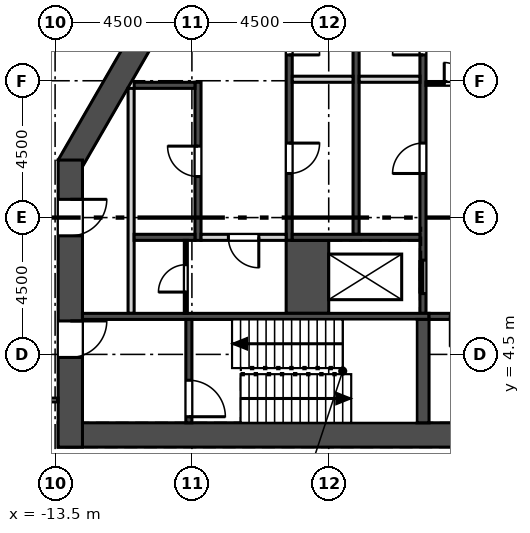
"""IFC4 building model, lengths in metres.
Left out: names, types, materials, properties, quantities, classifications, styles, units other than length and angle.
Written with IfcOpenShell. Run it as: python <this file> out.ifc"""

import sys

from ifc_helpers import new_model, si_unit, direction, frame, frame_2d, origin, place, context, subcontext, project, spatial, rectangle, extrude, element, fill, save


model = new_model("IFC4")
c1 = context("Model", 3, precision=1e-05, world=origin(), true_north=direction((0.0, 1.0)))
c2 = subcontext(c1, "Body", "Model", "MODEL_VIEW")
j1 = project(units=[si_unit("LENGTHUNIT", "METRE"), si_unit("PLANEANGLEUNIT", "RADIAN")], contexts=[c1])
p1 = place(None, origin())
s1 = spatial("IfcSite", under=j1, at=p1, CompositionType="ELEMENT")
p2 = place(p1, origin())
s2 = spatial("IfcBuilding", under=s1, at=p2, CompositionType="ELEMENT")
p3 = place(p2, frame((0.0, 0.0, 335.1)))
s3 = spatial("IfcBuildingStorey", under=s2, at=p3, CompositionType="ELEMENT", Elevation=335.1)
p4 = place(p3, frame((-13.4, 1.85, 0.0), z_axis=(0.0, 0.0, 1.0), x_axis=(1.0, 0.0, 0.0)))
e1 = element("IfcWall", 1, at=p4, inside=s3, PredefinedType="SHEAR", context=c2, shape_type="SweptSolid", body=[
    extrude(rectangle(XDim=26.8, YDim=0.8, at=frame_2d((13.4, 0.0))), origin(), (0.0, 0.0, 1.0), 4.2),
])
p5 = place(p3, frame((-8.719, 18.2, 0.0), z_axis=(0.0, 0.0, 1.0), x_axis=(-0.500015780397, -0.866016292776, 0.0)))
e2 = element("IfcWall", 2, at=p5, inside=s3, PredefinedType="SHEAR", context=c2, shape_type="SweptSolid", body=[
    extrude(rectangle(XDim=8.67, YDim=0.8, at=frame_2d((4.335, 0.0))), origin(), (0.0, 0.0, 1.0), 4.2),
])
p6 = place(p3, frame((-13.0, 10.892, 0.0), z_axis=(0.0, 0.0, 1.0), x_axis=(0.0, -1.0, 0.0)))
e3 = element("IfcWall", 3, at=p6, inside=s3, PredefinedType="SHEAR", context=c2, shape_type="SweptSolid", body=[
    extrude(rectangle(XDim=9.442, YDim=0.8, at=frame_2d((4.721, 0.0))), origin(), (0.0, 0.0, 1.0), 4.2),
])
p7 = place(p6, frame((5.292, 0.0, 0.0)))
e4 = element("IfcOpeningElement", 4, at=p7, cuts=e3, PredefinedType="OPENING", context=c2, shape_type="SweptSolid", body=[
    extrude(rectangle(XDim=1.2, YDim=2.1, at=frame_2d((0.6, 1.05))), frame((0.0, 0.41, 0.0), z_axis=(0.0, -1.0, 0.0), x_axis=(1.0, 0.0, 0.0)), (0.0, 0.0, 1.0), 0.82),
])
p8 = place(p6, frame((1.292, 0.0, 0.0)))
e5 = element("IfcOpeningElement", 5, at=p8, cuts=e3, PredefinedType="OPENING", context=c2, shape_type="SweptSolid", body=[
    extrude(rectangle(XDim=1.2, YDim=2.1, at=frame_2d((0.6, 1.05))), frame((0.0, 0.41, 0.0), z_axis=(0.0, -1.0, 0.0), x_axis=(1.0, 0.0, 0.0)), (0.0, 0.0, 1.0), 0.82),
])
p9 = place(p3, frame((-4.353, 41.372, 0.0), z_axis=(0.0, 0.0, 1.0), x_axis=(-0.500001731347, -0.866024404189, 0.0)))
e6 = element("IfcWall", 6, at=p9, inside=s3, PredefinedType="SOLIDWALL", context=c2, shape_type="SweptSolid", body=[
    extrude(rectangle(XDim=38.87, YDim=0.34, at=frame_2d((19.435, 0.0))), origin(), (0.0, 0.0, 1.0), 3.8),
])
p10 = place(p9, frame((3.653, 0.0, 0.9)))
e7 = element("IfcOpeningElement", 7, at=p10, cuts=e6, PredefinedType="OPENING", context=c2, shape_type="SweptSolid", body=[
    extrude(rectangle(XDim=1.885, YDim=2.6, at=frame_2d((0.942, 1.3))), frame((0.0, 0.18, 0.0), z_axis=(0.0, -1.0, 0.0), x_axis=(1.0, 0.0, 0.0)), (0.0, 0.0, 1.0), 0.36),
])
p11 = place(p9, frame((6.653, 0.0, 0.9)))
e8 = element("IfcOpeningElement", 8, at=p11, cuts=e6, PredefinedType="OPENING", context=c2, shape_type="SweptSolid", body=[
    extrude(rectangle(XDim=1.885, YDim=2.6, at=frame_2d((0.942, 1.3))), frame((0.0, 0.18, 0.0), z_axis=(0.0, -1.0, 0.0), x_axis=(1.0, 0.0, 0.0)), (0.0, 0.0, 1.0), 0.36),
])
p12 = place(p9, frame((9.653, 0.0, 0.9)))
e9 = element("IfcOpeningElement", 9, at=p12, cuts=e6, PredefinedType="OPENING", context=c2, shape_type="SweptSolid", body=[
    extrude(rectangle(XDim=1.885, YDim=2.6, at=frame_2d((0.942, 1.3))), frame((0.0, 0.18, 0.0), z_axis=(0.0, -1.0, 0.0), x_axis=(1.0, 0.0, 0.0)), (0.0, 0.0, 1.0), 0.36),
])
p13 = place(p9, frame((12.653, 0.0, 0.9)))
e10 = element("IfcOpeningElement", 10, at=p13, cuts=e6, PredefinedType="OPENING", context=c2, shape_type="SweptSolid", body=[
    extrude(rectangle(XDim=1.885, YDim=2.6, at=frame_2d((0.942, 1.3))), frame((0.0, 0.18, 0.0), z_axis=(0.0, -1.0, 0.0), x_axis=(1.0, 0.0, 0.0)), (0.0, 0.0, 1.0), 0.36),
])
p14 = place(p9, frame((15.653, 0.0, 0.9)))
e11 = element("IfcOpeningElement", 11, at=p14, cuts=e6, PredefinedType="OPENING", context=c2, shape_type="SweptSolid", body=[
    extrude(rectangle(XDim=1.885, YDim=2.6, at=frame_2d((0.942, 1.3))), frame((0.0, 0.18, 0.0), z_axis=(0.0, -1.0, 0.0), x_axis=(1.0, 0.0, 0.0)), (0.0, 0.0, 1.0), 0.36),
])
p15 = place(p9, frame((18.653, 0.0, 0.9)))
e12 = element("IfcOpeningElement", 12, at=p15, cuts=e6, PredefinedType="OPENING", context=c2, shape_type="SweptSolid", body=[
    extrude(rectangle(XDim=1.885, YDim=2.6, at=frame_2d((0.942, 1.3))), frame((0.0, 0.18, 0.0), z_axis=(0.0, -1.0, 0.0), x_axis=(1.0, 0.0, 0.0)), (0.0, 0.0, 1.0), 0.36),
])
p16 = place(p9, frame((21.653, 0.0, 0.9)))
e13 = element("IfcOpeningElement", 13, at=p16, cuts=e6, PredefinedType="OPENING", context=c2, shape_type="SweptSolid", body=[
    extrude(rectangle(XDim=1.885, YDim=2.6, at=frame_2d((0.942, 1.3))), frame((0.0, 0.18, 0.0), z_axis=(0.0, -1.0, 0.0), x_axis=(1.0, 0.0, 0.0)), (0.0, 0.0, 1.0), 0.36),
])
p17 = place(p9, frame((24.653, 0.0, 0.9)))
e14 = element("IfcOpeningElement", 14, at=p17, cuts=e6, PredefinedType="OPENING", context=c2, shape_type="SweptSolid", body=[
    extrude(rectangle(XDim=1.885, YDim=2.6, at=frame_2d((0.942, 1.3))), frame((0.0, 0.18, 0.0), z_axis=(0.0, -1.0, 0.0), x_axis=(1.0, 0.0, 0.0)), (0.0, 0.0, 1.0), 0.36),
])
p18 = place(p9, frame((27.653, 0.0, 0.9)))
e15 = element("IfcOpeningElement", 15, at=p18, cuts=e6, PredefinedType="OPENING", context=c2, shape_type="SweptSolid", body=[
    extrude(rectangle(XDim=1.885, YDim=2.6, at=frame_2d((0.942, 1.3))), frame((0.0, 0.18, 0.0), z_axis=(0.0, -1.0, 0.0), x_axis=(1.0, 0.0, 0.0)), (0.0, 0.0, 1.0), 0.36),
])
p19 = place(p9, frame((30.653, 0.0, 0.9)))
e16 = element("IfcOpeningElement", 16, at=p19, cuts=e6, PredefinedType="OPENING", context=c2, shape_type="SweptSolid", body=[
    extrude(rectangle(XDim=1.885, YDim=2.6, at=frame_2d((0.942, 1.3))), frame((0.0, 0.18, 0.0), z_axis=(0.0, -1.0, 0.0), x_axis=(1.0, 0.0, 0.0)), (0.0, 0.0, 1.0), 0.36),
])
p20 = place(p9, frame((33.653, 0.0, 0.9)))
e17 = element("IfcOpeningElement", 17, at=p20, cuts=e6, PredefinedType="OPENING", context=c2, shape_type="SweptSolid", body=[
    extrude(rectangle(XDim=1.885, YDim=2.6, at=frame_2d((0.942, 1.3))), frame((0.0, 0.18, 0.0), z_axis=(0.0, -1.0, 0.0), x_axis=(1.0, 0.0, 0.0)), (0.0, 0.0, 1.0), 0.36),
])
p21 = place(p9, frame((1.269, 0.0, 0.9)))
e18 = element("IfcOpeningElement", 18, at=p21, cuts=e6, PredefinedType="OPENING", context=c2, shape_type="SweptSolid", body=[
    extrude(rectangle(XDim=1.115, YDim=2.4, at=frame_2d((0.558, 1.2))), frame((0.0, 0.18, 0.0), z_axis=(0.0, -1.0, 0.0), x_axis=(1.0, 0.0, 0.0)), (0.0, 0.0, 1.0), 0.36),
])
p22 = place(p9, frame((36.646, 0.0, 0.9)))
e19 = element("IfcOpeningElement", 19, at=p22, cuts=e6, PredefinedType="OPENING", context=c2, shape_type="SweptSolid", body=[
    extrude(rectangle(XDim=1.115, YDim=2.4, at=frame_2d((0.558, 1.2))), frame((0.0, 0.18, 0.0), z_axis=(0.0, -1.0, 0.0), x_axis=(1.0, 0.0, 0.0)), (0.0, 0.0, 1.0), 0.36),
])
p23 = place(p3, frame((-11.0, 5.85, 0.0), z_axis=(0.0, 0.0, 1.0), x_axis=(0.0, 1.0, 0.0)))
e20 = element("IfcWall", 20, at=p23, inside=s3, PredefinedType="SOLIDWALL", context=c2, shape_type="SweptSolid", body=[
    extrude(rectangle(XDim=7.4, YDim=0.2, at=frame_2d((3.7, 0.0))), origin(), (0.0, 0.0, 1.0), 3.8),
])
p24 = place(p3, frame((-8.8, 8.25, -0.4), z_axis=(0.0, 0.0, 1.0), x_axis=(0.0, 1.0, 0.0)))
e21 = element("IfcWall", 21, at=p24, inside=s3, PredefinedType="SOLIDWALL", context=c2, shape_type="SweptSolid", body=[
    extrude(rectangle(XDim=5.2, YDim=0.2, at=frame_2d((2.6, 0.0))), origin(), (0.0, 0.0, 1.0), 4.2),
])
p25 = place(p24, frame((2.1, 0.0, 0.4)))
e22 = element("IfcOpeningElement", 22, at=p25, cuts=e21, PredefinedType="OPENING", context=c2, shape_type="SweptSolid", body=[
    extrude(rectangle(XDim=1.0, YDim=2.1, at=frame_2d((0.5, 1.05))), frame((0.0, 0.11, 0.0), z_axis=(0.0, -1.0, 0.0), x_axis=(1.0, 0.0, 0.0)), (0.0, 0.0, 1.0), 0.22),
])
p26 = place(p3, frame((-5.8, 8.25, -0.4), z_axis=(0.0, 0.0, 1.0), x_axis=(0.0, 1.0, 0.0)))
e23 = element("IfcWall", 23, at=p26, inside=s3, PredefinedType="SOLIDWALL", context=c2, shape_type="SweptSolid", body=[
    extrude(rectangle(XDim=8.0, YDim=0.2, at=frame_2d((4.0, 0.0))), origin(), (0.0, 0.0, 1.0), 4.2),
])
p27 = place(p26, frame((2.2, 0.0, 0.4)))
e24 = element("IfcOpeningElement", 24, at=p27, cuts=e23, PredefinedType="OPENING", context=c2, shape_type="SweptSolid", body=[
    extrude(rectangle(XDim=1.0, YDim=2.1, at=frame_2d((0.5, 1.05))), frame((0.0, 0.11, 0.0), z_axis=(0.0, -1.0, 0.0), x_axis=(1.0, 0.0, 0.0)), (0.0, 0.0, 1.0), 0.22),
])
p28 = place(p26, frame((6.1, 0.0, 0.4)))
e25 = element("IfcOpeningElement", 25, at=p28, cuts=e23, PredefinedType="OPENING", context=c2, shape_type="SweptSolid", body=[
    extrude(rectangle(XDim=1.0, YDim=2.1, at=frame_2d((0.5, 1.05))), frame((0.0, 0.11, 0.0), z_axis=(0.0, -1.0, 0.0), x_axis=(1.0, 0.0, 0.0)), (0.0, 0.0, 1.0), 0.22),
])
p29 = place(p3, frame((-3.6, 8.45, -0.4), z_axis=(0.0, 0.0, 1.0), x_axis=(0.0, 1.0, 0.0)))
e26 = element("IfcWall", 26, at=p29, inside=s3, PredefinedType="SOLIDWALL", context=c2, shape_type="SweptSolid", body=[
    extrude(rectangle(XDim=7.8, YDim=0.2, at=frame_2d((3.9, 0.0))), origin(), (0.0, 0.0, 1.0), 4.2),
])
p30 = place(p3, frame((-1.4, 5.85, -0.4), z_axis=(0.0, 0.0, 1.0), x_axis=(0.0, 1.0, 0.0)))
e27 = element("IfcWall", 27, at=p30, inside=s3, PredefinedType="SOLIDWALL", context=c2, shape_type="SweptSolid", body=[
    extrude(rectangle(XDim=11.75, YDim=0.2, at=frame_2d((5.875, 0.0))), origin(), (0.0, 0.0, 1.0), 4.2),
])
p31 = place(p30, frame((0.65, 0.0, 0.4)))
e28 = element("IfcOpeningElement", 28, at=p31, cuts=e27, PredefinedType="OPENING", context=c2, shape_type="SweptSolid", body=[
    extrude(rectangle(XDim=1.1, YDim=2.1, at=frame_2d((0.55, 1.05))), frame((0.0, 0.11, 0.0), z_axis=(0.0, -1.0, 0.0), x_axis=(1.0, 0.0, 0.0)), (0.0, 0.0, 1.0), 0.22),
])
p32 = place(p30, frame((4.6, 0.0, 0.4)))
e29 = element("IfcOpeningElement", 29, at=p32, cuts=e27, PredefinedType="OPENING", context=c2, shape_type="SweptSolid", body=[
    extrude(rectangle(XDim=1.0, YDim=2.1, at=frame_2d((0.5, 1.05))), frame((0.0, 0.11, 0.0), z_axis=(0.0, -1.0, 0.0), x_axis=(1.0, 0.0, 0.0)), (0.0, 0.0, 1.0), 0.22),
])
p33 = place(p30, frame((8.5, 0.0, 0.4)))
e30 = element("IfcOpeningElement", 30, at=p33, cuts=e27, PredefinedType="OPENING", context=c2, shape_type="SweptSolid", body=[
    extrude(rectangle(XDim=1.0, YDim=2.1, at=frame_2d((0.5, 1.05))), frame((0.0, 0.11, 0.0), z_axis=(0.0, -1.0, 0.0), x_axis=(1.0, 0.0, 0.0)), (0.0, 0.0, 1.0), 0.22),
])
p34 = place(p3, frame((-5.2, 5.85, -0.4), z_axis=(0.0, 0.0, 1.0), x_axis=(0.0, 1.0, 0.0)))
e31 = element("IfcWall", 31, at=p34, inside=s3, PredefinedType="SOLIDWALL", context=c2, shape_type="SweptSolid", body=[
    extrude(rectangle(XDim=2.4, YDim=1.4, at=frame_2d((1.2, 0.0))), origin(), (0.0, 0.0, 1.0), 4.2),
])
p35 = place(p3, frame((-10.9, 8.35, -0.4), z_axis=(0.0, 0.0, 1.0), x_axis=(1.0, 0.0, 0.0)))
e32 = element("IfcWall", 32, at=p35, inside=s3, PredefinedType="SOLIDWALL", context=c2, shape_type="SweptSolid", body=[
    extrude(rectangle(XDim=2.0, YDim=0.2, at=frame_2d((1.0, 0.0))), origin(), (0.0, 0.0, 1.0), 4.2),
])
p36 = place(p3, frame((-5.7, 8.35, -0.4), z_axis=(0.0, 0.0, 1.0), x_axis=(1.0, 0.0, 0.0)))
e33 = element("IfcWall", 33, at=p36, inside=s3, PredefinedType="SOLIDWALL", context=c2, shape_type="SweptSolid", body=[
    extrude(rectangle(XDim=4.2, YDim=0.2, at=frame_2d((2.1, 0.0))), origin(), (0.0, 0.0, 1.0), 4.2),
])
p37 = place(p3, frame((-12.6, 5.75, -0.4), z_axis=(0.0, 0.0, 1.0), x_axis=(1.0, 0.0, 0.0)))
e34 = element("IfcWall", 34, at=p37, inside=s3, PredefinedType="SOLIDWALL", context=c2, shape_type="SweptSolid", body=[
    extrude(rectangle(XDim=11.4, YDim=0.2, at=frame_2d((5.7, 0.0))), origin(), (0.0, 0.0, 1.0), 4.2),
])
p38 = place(p3, frame((-1.2, 5.75, -0.4), z_axis=(0.0, 0.0, 1.0), x_axis=(1.0, 0.0, 0.0)))
e35 = element("IfcWall", 35, at=p38, inside=s3, PredefinedType="SOLIDWALL", context=c2, shape_type="SweptSolid", body=[
    extrude(rectangle(XDim=2.4, YDim=0.2, at=frame_2d((1.2, 0.0))), origin(), (0.0, 0.0, 1.0), 4.2),
])
p39 = place(p38, frame((0.7, 0.0, 0.4)))
e36 = element("IfcOpeningElement", 36, at=p39, cuts=e35, PredefinedType="OPENING", context=c2, shape_type="SweptSolid", body=[
    extrude(rectangle(XDim=1.0, YDim=2.1, at=frame_2d((0.5, 1.05))), frame((0.0, 0.11, 0.0), z_axis=(0.0, -1.0, 0.0), x_axis=(1.0, 0.0, 0.0)), (0.0, 0.0, 1.0), 0.22),
])
p40 = place(p3, frame((-9.1, 2.25, -0.4), z_axis=(0.0, 0.0, 1.0), x_axis=(0.0, 1.0, 0.0)))
e37 = element("IfcWall", 37, at=p40, inside=s3, PredefinedType="SOLIDWALL", context=c2, shape_type="SweptSolid", body=[
    extrude(rectangle(XDim=3.4, YDim=0.2, at=frame_2d((1.7, 0.0))), origin(), (0.0, 0.0, 1.0), 4.2),
])
p41 = place(p40, frame((0.2, 0.0, 0.4)))
e38 = element("IfcOpeningElement", 38, at=p41, cuts=e37, PredefinedType="OPENING", context=c2, shape_type="SweptSolid", body=[
    extrude(rectangle(XDim=1.2, YDim=2.1, at=frame_2d((0.6, 1.05))), frame((0.0, 0.11, 0.0), z_axis=(0.0, -1.0, 0.0), x_axis=(1.0, 0.0, 0.0)), (0.0, 0.0, 1.0), 0.22),
])
p42 = place(p3, frame((-1.4, 2.25, -0.4), z_axis=(0.0, 0.0, 1.0), x_axis=(0.0, 1.0, 0.0)))
e39 = element("IfcWall", 39, at=p42, inside=s3, PredefinedType="SOLIDWALL", context=c2, shape_type="SweptSolid", body=[
    extrude(rectangle(XDim=3.4, YDim=0.4, at=frame_2d((1.7, 0.0))), origin(), (0.0, 0.0, 1.0), 4.2),
])
p43 = place(p3, frame((-10.9, 13.35, -0.4), z_axis=(0.0, 0.0, 1.0), x_axis=(1.0, 0.0, 0.0)))
e40 = element("IfcWall", 40, at=p43, inside=s3, PredefinedType="SOLIDWALL", context=c2, shape_type="SweptSolid", body=[
    extrude(rectangle(XDim=2.0, YDim=0.2, at=frame_2d((1.0, 0.0))), origin(), (0.0, 0.0, 1.0), 4.2),
])
for number, where, z_axis, x_axis in (
    (41, (-5.7, 13.55, 0.0), (0.0, 0.0, 1.0), (1.0, 0.0, 0.0)),
    (42, (-3.5, 13.55, 0.0), (0.0, 0.0, 1.0), (1.0, 0.0, 0.0)),
):
    element("IfcWall", number, at=place(p3, frame(where, z_axis=z_axis, x_axis=x_axis)), inside=s3, PredefinedType="SOLIDWALL", context=c2, shape_type="SweptSolid", body=[
        extrude(rectangle(XDim=2.0, YDim=0.2, at=frame_2d((1.0, 0.0))), origin(), (0.0, 0.0, 1.0), 3.8),
    ])
p44 = place(p3, frame((-9.2, 5.85, 0.0), z_axis=(0.0, 0.0, 1.0), x_axis=(0.0, 1.0, 0.0)))
e43 = element("IfcWall", 43, at=p44, inside=s3, PredefinedType="PARTITIONING", context=c2, shape_type="SweptSolid", body=[
    extrude(rectangle(XDim=2.4, YDim=0.1, at=frame_2d((1.2, 0.0))), origin(), (0.0, 0.0, 1.0), 3.8),
])
p45 = place(p44, frame((0.7, 0.0, 0.0)))
e44 = element("IfcOpeningElement", 44, at=p45, cuts=e43, PredefinedType="OPENING", context=c2, shape_type="SweptSolid", body=[
    extrude(rectangle(XDim=0.9, YDim=2.1, at=frame_2d((0.45, 1.05))), frame((0.0, 0.06, 0.0), z_axis=(0.0, -1.0, 0.0), x_axis=(1.0, 0.0, 0.0)), (0.0, 0.0, 1.0), 0.12),
])
p46 = place(p3, frame((-8.7, 8.35, 0.0), z_axis=(0.0, 0.0, 1.0), x_axis=(1.0, 0.0, 0.0)))
e45 = element("IfcWall", 45, at=p46, inside=s3, PredefinedType="SOLIDWALL", context=c2, shape_type="SweptSolid", body=[
    extrude(rectangle(XDim=2.8, YDim=0.2, at=frame_2d((1.4, 0.0))), origin(), (0.0, 0.0, 1.0), 3.8),
])
p47 = place(p46, frame((0.9, 0.0, 0.0)))
e46 = element("IfcOpeningElement", 46, at=p47, cuts=e45, PredefinedType="OPENING", context=c2, shape_type="SweptSolid", body=[
    extrude(rectangle(XDim=1.0, YDim=2.1, at=frame_2d((0.5, 1.05))), frame((0.0, 0.11, 0.0), z_axis=(0.0, -1.0, 0.0), x_axis=(1.0, 0.0, 0.0)), (0.0, 0.0, 1.0), 0.22),
])
p48 = place(p3, frame((-1.3, 13.4, 0.0), z_axis=(0.0, 0.0, 1.0), x_axis=(1.0, 0.0, 0.0)))
e47 = element("IfcWall", 47, at=p48, inside=s3, PredefinedType="PARTITIONING", context=c2, shape_type="SweptSolid", body=[
    extrude(rectangle(XDim=2.6, YDim=0.1, at=frame_2d((1.3, 0.0))), origin(), (0.0, 0.0, 1.0), 3.8),
])
p49 = place(p48, frame((0.6, 0.0, 0.0)))
e48 = element("IfcOpeningElement", 48, at=p49, cuts=e47, PredefinedType="OPENING", context=c2, shape_type="SweptSolid", body=[
    extrude(rectangle(XDim=1.4, YDim=2.1, at=frame_2d((0.7, 1.05))), frame((0.0, 0.06, 0.0), z_axis=(0.0, -1.0, 0.0), x_axis=(1.0, 0.0, 0.0)), (0.0, 0.0, 1.0), 0.12),
])
p50 = place(p3, frame((-13.4, 3.0, 0.0), z_axis=(0.0, 0.0, 1.0), x_axis=(-1.0, 0.0, 0.0)))
e49 = element("IfcWall", 49, at=p50, inside=s3, PredefinedType="PARTITIONING", context=c2, shape_type="SweptSolid", body=[
    extrude(rectangle(XDim=2.1, YDim=0.125, at=frame_2d((1.05, 0.0))), origin(), (0.0, 0.0, 1.0), 3.8),
])
p51 = place(p3, frame((-15.5, 11.455, 0.0), z_axis=(0.0, 0.0, 1.0), x_axis=(0.500005024956, 0.866022502605, 0.0)))
e50 = element("IfcWall", 50, at=p51, inside=s3, PredefinedType="PARTITIONING", context=c2, shape_type="SweptSolid", body=[
    extrude(rectangle(XDim=4.388, YDim=0.125, at=frame_2d((2.194, 0.0))), origin(), (0.0, 0.0, 1.0), 3.8),
])
p52 = place(p31, origin())
e51 = element("IfcDoor", 51, at=p52, inside=s3, OperationType="SLIDING_TO_RIGHT", PredefinedType="DOOR", context=c2, shape_type="SweptSolid", body=[
    extrude(rectangle(XDim=1.1, YDim=2.1, at=frame_2d((0.55, 1.05))), frame((0.0, 0.025, 0.0), z_axis=(0.0, -1.0, 0.0), x_axis=(1.0, 0.0, 0.0)), (0.0, 0.0, 1.0), 0.05),
])
fill(e28, e51)
p53 = place(p25, origin())
e52 = element("IfcDoor", 52, at=p53, inside=s3, OperationType="SINGLE_SWING_RIGHT", PredefinedType="DOOR", context=c2, shape_type="SweptSolid", body=[
    extrude(rectangle(XDim=1.0, YDim=2.1, at=frame_2d((0.5, 1.05))), frame((0.0, 0.025, 0.0), z_axis=(0.0, -1.0, 0.0), x_axis=(1.0, 0.0, 0.0)), (0.0, 0.0, 1.0), 0.05),
])
fill(e22, e52)
p54 = place(p27, frame((1.0, 0.0, 0.0), z_axis=(0.0, 0.0, 1.0), x_axis=(-1.0, 0.0, 0.0)))
e53 = element("IfcDoor", 53, at=p54, inside=s3, OperationType="SINGLE_SWING_LEFT", PredefinedType="DOOR", context=c2, shape_type="SweptSolid", body=[
    extrude(rectangle(XDim=1.0, YDim=2.1, at=frame_2d((0.5, 1.05))), frame((0.0, 0.025, 0.0), z_axis=(0.0, -1.0, 0.0), x_axis=(1.0, 0.0, 0.0)), (0.0, 0.0, 1.0), 0.05),
])
fill(e24, e53)
p55 = place(p28, frame((1.0, 0.0, 0.0), z_axis=(0.0, 0.0, 1.0), x_axis=(-1.0, 0.0, 0.0)))
e54 = element("IfcDoor", 54, at=p55, inside=s3, OperationType="SINGLE_SWING_RIGHT", PredefinedType="DOOR", context=c2, shape_type="SweptSolid", body=[
    extrude(rectangle(XDim=1.0, YDim=2.1, at=frame_2d((0.5, 1.05))), frame((0.0, 0.025, 0.0), z_axis=(0.0, -1.0, 0.0), x_axis=(1.0, 0.0, 0.0)), (0.0, 0.0, 1.0), 0.05),
])
fill(e25, e54)
p56 = place(p32, origin())
e55 = element("IfcDoor", 55, at=p56, inside=s3, OperationType="SINGLE_SWING_LEFT", PredefinedType="DOOR", context=c2, shape_type="SweptSolid", body=[
    extrude(rectangle(XDim=1.0, YDim=2.1, at=frame_2d((0.5, 1.05))), frame((0.0, 0.025, 0.0), z_axis=(0.0, -1.0, 0.0), x_axis=(1.0, 0.0, 0.0)), (0.0, 0.0, 1.0), 0.05),
])
fill(e29, e55)
p57 = place(p33, origin())
e56 = element("IfcDoor", 56, at=p57, inside=s3, OperationType="SINGLE_SWING_LEFT", PredefinedType="DOOR", context=c2, shape_type="SweptSolid", body=[
    extrude(rectangle(XDim=1.0, YDim=2.1, at=frame_2d((0.5, 1.05))), frame((0.0, 0.025, 0.0), z_axis=(0.0, -1.0, 0.0), x_axis=(1.0, 0.0, 0.0)), (0.0, 0.0, 1.0), 0.05),
])
fill(e30, e56)
p58 = place(p47, frame((1.0, 0.0, 0.0), z_axis=(0.0, 0.0, 1.0), x_axis=(-1.0, 0.0, 0.0)))
e57 = element("IfcDoor", 57, at=p58, inside=s3, OperationType="SINGLE_SWING_LEFT", PredefinedType="DOOR", context=c2, shape_type="SweptSolid", body=[
    extrude(rectangle(XDim=1.0, YDim=2.1, at=frame_2d((0.5, 1.05))), frame((0.0, 0.025, 0.0), z_axis=(0.0, -1.0, 0.0), x_axis=(1.0, 0.0, 0.0)), (0.0, 0.0, 1.0), 0.05),
])
fill(e46, e57)
p59 = place(p45, origin())
e58 = element("IfcDoor", 58, at=p59, inside=s3, OperationType="SINGLE_SWING_LEFT", PredefinedType="DOOR", context=c2, shape_type="SweptSolid", body=[
    extrude(rectangle(XDim=0.9, YDim=2.1, at=frame_2d((0.45, 1.05))), frame((0.0, 0.025, 0.0), z_axis=(0.0, -1.0, 0.0), x_axis=(1.0, 0.0, 0.0)), (0.0, 0.0, 1.0), 0.05),
])
fill(e44, e58)
p60 = place(p7, origin())
e59 = element("IfcDoor", 59, at=p60, inside=s3, OperationType="SINGLE_SWING_LEFT", PredefinedType="DOOR", context=c2, shape_type="SweptSolid", body=[
    extrude(rectangle(XDim=1.2, YDim=2.1, at=frame_2d((0.6, 1.05))), frame((0.0, 0.025, 0.0), z_axis=(0.0, -1.0, 0.0), x_axis=(1.0, 0.0, 0.0)), (0.0, 0.0, 1.0), 0.05),
])
fill(e4, e59)
p61 = place(p41, frame((1.2, 0.0, 0.0), z_axis=(0.0, 0.0, 1.0), x_axis=(-1.0, 0.0, 0.0)))
e60 = element("IfcDoor", 60, at=p61, inside=s3, OperationType="SINGLE_SWING_RIGHT", PredefinedType="DOOR", context=c2, shape_type="SweptSolid", body=[
    extrude(rectangle(XDim=1.2, YDim=2.1, at=frame_2d((0.6, 1.05))), frame((0.0, 0.025, 0.0), z_axis=(0.0, -1.0, 0.0), x_axis=(1.0, 0.0, 0.0)), (0.0, 0.0, 1.0), 0.05),
])
fill(e38, e60)
p62 = place(p8, origin())
e61 = element("IfcDoor", 61, at=p62, inside=s3, OperationType="SINGLE_SWING_LEFT", PredefinedType="DOOR", context=c2, shape_type="SweptSolid", body=[
    extrude(rectangle(XDim=1.2, YDim=2.1, at=frame_2d((0.6, 1.05))), frame((0.0, 0.025, 0.0), z_axis=(0.0, -1.0, 0.0), x_axis=(1.0, 0.0, 0.0)), (0.0, 0.0, 1.0), 0.05),
])
fill(e5, e61)
p63 = place(p49, origin())
e62 = element("IfcDoor", 62, at=p63, inside=s3, OperationType="DOUBLE_DOOR_SINGLE_SWING", PredefinedType="DOOR", context=c2, shape_type="SweptSolid", body=[
    extrude(rectangle(XDim=1.4, YDim=2.1, at=frame_2d((0.7, 1.05))), frame((0.0, 0.025, 0.0), z_axis=(0.0, -1.0, 0.0), x_axis=(1.0, 0.0, 0.0)), (0.0, 0.0, 1.0), 0.05),
])
fill(e48, e62)
save(model, sys.argv[1])
